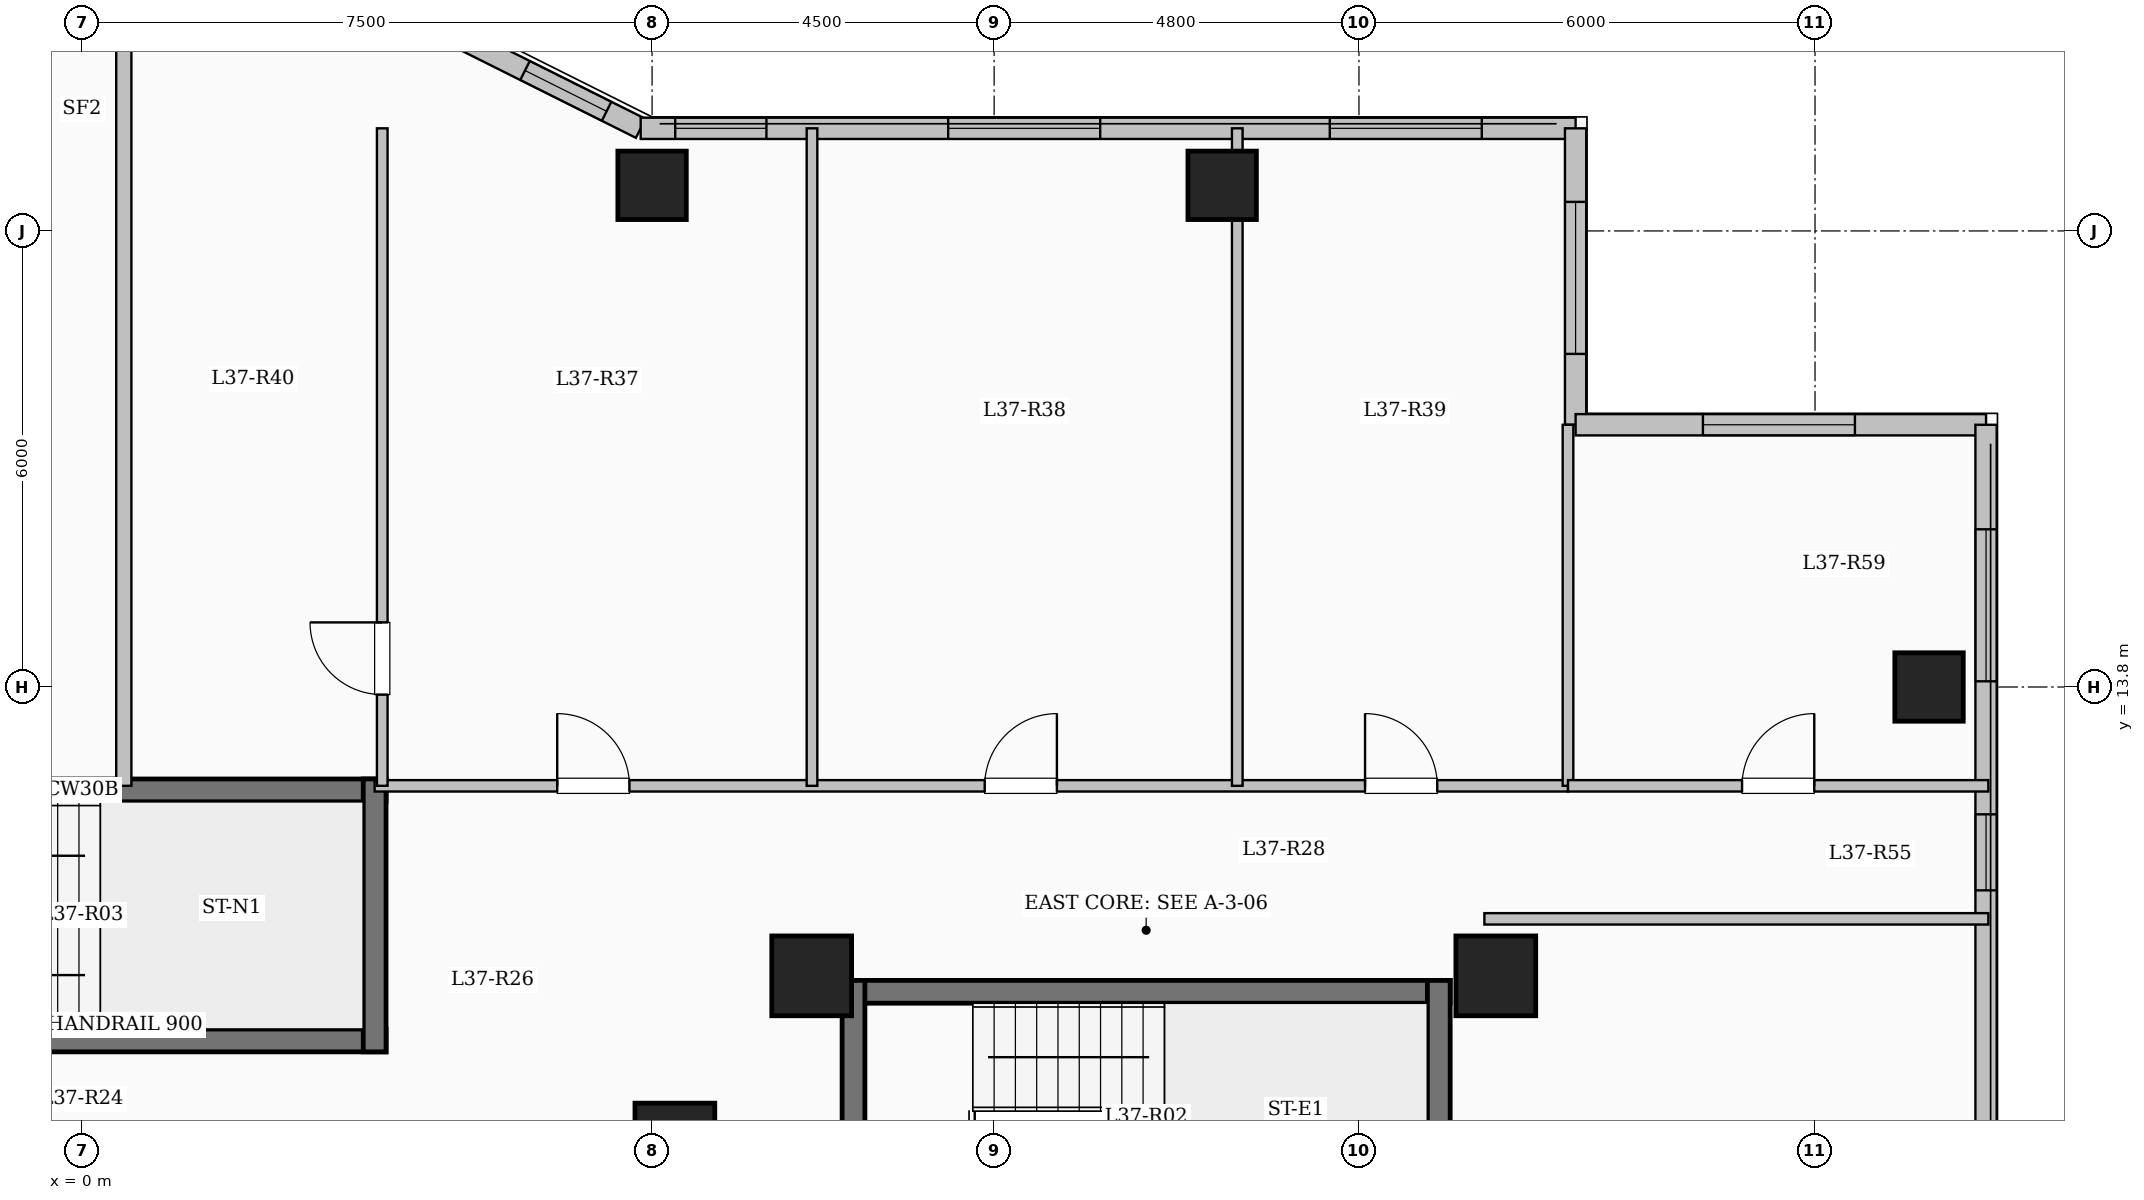
"""IFC4 building model, lengths in metres.
Left out: names, types, materials, properties, quantities, classifications, styles, units other than length and angle.
Written with IfcOpenShell. Run it as: python <this file> out.ifc"""

import sys

from ifc_helpers import new_model, si_unit, direction, frame, frame_2d, origin, origin_2d, place, context, subcontext, project, spatial, rectangle, extrude, element, fill, save


model = new_model("IFC4")
c1 = context("Model", 3, precision=1e-05, world=origin(), true_north=direction((0.0, 1.0)))
c2 = subcontext(c1, "Body", "Model", "MODEL_VIEW")
j1 = project(units=[si_unit("LENGTHUNIT", "METRE"), si_unit("PLANEANGLEUNIT", "RADIAN")], contexts=[c1])
p1 = place(None, origin())
s1 = spatial("IfcSite", under=j1, at=p1, CompositionType="ELEMENT")
p2 = place(p1, origin())
s2 = spatial("IfcBuilding", under=s1, at=p2, CompositionType="ELEMENT")
p3 = place(p2, frame((0.0, 0.0, 139.3)))
s3 = spatial("IfcBuildingStorey", under=s2, at=p3, CompositionType="ELEMENT", Elevation=139.3)
for number, where, z_axis, x_axis in (
    (1, (7.8, 7.8, 0.0), (0.0, 0.0, 1.0), (1.0, 0.0, 0.0)),
    (2, (9.6, 10.0, 0.0), (0.0, 0.0, 1.0), (1.0, 0.0, 0.0)),
    (3, (18.6, 10.0, 0.0), (0.0, 0.0, 1.0), (1.0, 0.0, 0.0)),
):
    element("IfcColumn", number, at=place(p3, frame(where, z_axis=z_axis, x_axis=x_axis)), inside=s3, PredefinedType="COLUMN", context=c2, shape_type="SweptSolid", body=[
        extrude(rectangle(XDim=1.05, YDim=1.05, at=origin_2d()), origin(), (0.0, 0.0, 1.0), 3.35),
    ])
for number, where, z_axis, x_axis in (
    (4, (7.5, 20.4, 0.0), (0.0, 0.0, 1.0), (1.0, 0.0, 0.0)),
    (5, (15.0, 20.4, 0.0), (0.0, 0.0, 1.0), (1.0, 0.0, 0.0)),
    (6, (24.3, 13.8, 0.0), (0.0, 0.0, 1.0), (1.0, 0.0, 0.0)),
):
    element("IfcColumn", number, at=place(p3, frame(where, z_axis=z_axis, x_axis=x_axis)), inside=s3, PredefinedType="COLUMN", context=c2, shape_type="SweptSolid", body=[
        extrude(rectangle(XDim=0.9, YDim=0.9, at=origin_2d()), origin(), (0.0, 0.0, 1.0), 3.35),
    ])
p4 = place(p3, frame((4.35, 22.65, 0.0), z_axis=(0.0, 0.0, 1.0), x_axis=(0.894427191, -0.4472135955, 0.0)))
e7 = element("IfcWall", 7, at=p4, inside=s3, PredefinedType="SOLIDWALL", context=c2, shape_type="SweptSolid", body=[
    extrude(rectangle(XDim=3.354, YDim=0.28, at=frame_2d((1.677, 0.0))), origin(), (0.0, 0.0, 1.0), 3.1),
])
p5 = place(p4, frame((1.653, 0.0, 0.95)))
e8 = element("IfcOpeningElement", 8, at=p5, cuts=e7, PredefinedType="OPENING", context=c2, shape_type="SweptSolid", body=[
    extrude(rectangle(XDim=1.2, YDim=1.5, at=frame_2d((0.6, 0.75))), frame((0.0, 0.15, 0.0), z_axis=(0.0, -1.0, 0.0), x_axis=(1.0, 0.0, 0.0)), (0.0, 0.0, 1.0), 0.3),
])
p6 = place(p3, frame((7.35, 21.15, 0.0), z_axis=(0.0, 0.0, 1.0), x_axis=(1.0, 0.0, 0.0)))
e9 = element("IfcWall", 9, at=p6, inside=s3, PredefinedType="SOLIDWALL", context=c2, shape_type="SweptSolid", body=[
    extrude(rectangle(XDim=12.3, YDim=0.28, at=frame_2d((6.15, 0.0))), origin(), (0.0, 0.0, 1.0), 3.1),
])
p7 = place(p6, frame((0.454, 0.0, 0.95)))
e10 = element("IfcOpeningElement", 10, at=p7, cuts=e9, PredefinedType="OPENING", context=c2, shape_type="SweptSolid", body=[
    extrude(rectangle(XDim=1.2, YDim=1.5, at=frame_2d((0.6, 0.75))), frame((0.0, 0.15, 0.0), z_axis=(0.0, -1.0, 0.0), x_axis=(1.0, 0.0, 0.0)), (0.0, 0.0, 1.0), 0.3),
])
p8 = place(p6, frame((4.045, 0.0, 0.9)))
e11 = element("IfcOpeningElement", 11, at=p8, cuts=e9, PredefinedType="OPENING", context=c2, shape_type="SweptSolid", body=[
    extrude(rectangle(XDim=2.0, YDim=1.7, at=frame_2d((1.0, 0.85))), frame((0.0, 0.15, 0.0), z_axis=(0.0, -1.0, 0.0), x_axis=(1.0, 0.0, 0.0)), (0.0, 0.0, 1.0), 0.3),
])
p9 = place(p6, frame((9.066, 0.0, 0.9)))
e12 = element("IfcOpeningElement", 12, at=p9, cuts=e9, PredefinedType="OPENING", context=c2, shape_type="SweptSolid", body=[
    extrude(rectangle(XDim=2.0, YDim=1.7, at=frame_2d((1.0, 0.85))), frame((0.0, 0.15, 0.0), z_axis=(0.0, -1.0, 0.0), x_axis=(1.0, 0.0, 0.0)), (0.0, 0.0, 1.0), 0.3),
])
p10 = place(p3, frame((19.65, 21.15, 0.0), z_axis=(0.0, 0.0, 1.0), x_axis=(0.0, -1.0, 0.0)))
e13 = element("IfcWall", 13, at=p10, inside=s3, PredefinedType="SOLIDWALL", context=c2, shape_type="SweptSolid", body=[
    extrude(rectangle(XDim=3.9, YDim=0.28, at=frame_2d((1.95, 0.0))), origin(), (0.0, 0.0, 1.0), 3.1),
])
p11 = place(p10, frame((0.968, 0.0, 0.9)))
e14 = element("IfcOpeningElement", 14, at=p11, cuts=e13, PredefinedType="OPENING", context=c2, shape_type="SweptSolid", body=[
    extrude(rectangle(XDim=2.0, YDim=1.7, at=frame_2d((1.0, 0.85))), frame((0.0, 0.15, 0.0), z_axis=(0.0, -1.0, 0.0), x_axis=(1.0, 0.0, 0.0)), (0.0, 0.0, 1.0), 0.3),
])
p12 = place(p3, frame((19.65, 17.25, 0.0), z_axis=(0.0, 0.0, 1.0), x_axis=(1.0, 0.0, 0.0)))
e15 = element("IfcWall", 15, at=p12, inside=s3, PredefinedType="SOLIDWALL", context=c2, shape_type="SweptSolid", body=[
    extrude(rectangle(XDim=5.4, YDim=0.28, at=frame_2d((2.7, 0.0))), origin(), (0.0, 0.0, 1.0), 3.1),
])
p13 = place(p12, frame((1.675, 0.0, 0.9)))
e16 = element("IfcOpeningElement", 16, at=p13, cuts=e15, PredefinedType="OPENING", context=c2, shape_type="SweptSolid", body=[
    extrude(rectangle(XDim=2.0, YDim=1.7, at=frame_2d((1.0, 0.85))), frame((0.0, 0.15, 0.0), z_axis=(0.0, -1.0, 0.0), x_axis=(1.0, 0.0, 0.0)), (0.0, 0.0, 1.0), 0.3),
])
p14 = place(p3, frame((25.05, 17.25, 0.0), z_axis=(0.0, 0.0, 1.0), x_axis=(0.0, -1.0, 0.0)))
e17 = element("IfcWall", 17, at=p14, inside=s3, PredefinedType="SOLIDWALL", context=c2, shape_type="SweptSolid", body=[
    extrude(rectangle(XDim=34.5, YDim=0.28, at=frame_2d((17.25, 0.0))), origin(), (0.0, 0.0, 1.0), 3.1),
])
p15 = place(p14, frame((1.375, 0.0, 0.9)))
e18 = element("IfcOpeningElement", 18, at=p15, cuts=e17, PredefinedType="OPENING", context=c2, shape_type="SweptSolid", body=[
    extrude(rectangle(XDim=2.0, YDim=1.7, at=frame_2d((1.0, 0.85))), frame((0.0, 0.15, 0.0), z_axis=(0.0, -1.0, 0.0), x_axis=(1.0, 0.0, 0.0)), (0.0, 0.0, 1.0), 0.3),
])
p16 = place(p14, frame((5.125, 0.0, 0.95)))
e19 = element("IfcOpeningElement", 19, at=p16, cuts=e17, PredefinedType="OPENING", context=c2, shape_type="SweptSolid", body=[
    extrude(rectangle(XDim=1.0, YDim=1.5, at=frame_2d((0.5, 0.75))), frame((0.0, 0.15, 0.0), z_axis=(0.0, -1.0, 0.0), x_axis=(1.0, 0.0, 0.0)), (0.0, 0.0, 1.0), 0.3),
])
p17 = place(p14, frame((14.5, 0.0, 0.9)))
e20 = element("IfcOpeningElement", 20, at=p17, cuts=e17, PredefinedType="OPENING", context=c2, shape_type="SweptSolid", body=[
    extrude(rectangle(XDim=2.0, YDim=1.7, at=frame_2d((1.0, 0.85))), frame((0.0, 0.15, 0.0), z_axis=(0.0, -1.0, 0.0), x_axis=(1.0, 0.0, 0.0)), (0.0, 0.0, 1.0), 0.3),
])
p18 = place(p14, frame((25.258, 0.0, 0.9)))
e21 = element("IfcOpeningElement", 21, at=p18, cuts=e17, PredefinedType="OPENING", context=c2, shape_type="SweptSolid", body=[
    extrude(rectangle(XDim=1.5, YDim=1.65, at=frame_2d((0.75, 0.825))), frame((0.0, 0.15, 0.0), z_axis=(0.0, -1.0, 0.0), x_axis=(1.0, 0.0, 0.0)), (0.0, 0.0, 1.0), 0.3),
])
p19 = place(p14, frame((29.95, 0.0, 0.9)))
e22 = element("IfcOpeningElement", 22, at=p19, cuts=e17, PredefinedType="OPENING", context=c2, shape_type="SweptSolid", body=[
    extrude(rectangle(XDim=2.2, YDim=1.75, at=frame_2d((1.1, 0.875))), frame((0.0, 0.15, 0.0), z_axis=(0.0, -1.0, 0.0), x_axis=(1.0, 0.0, 0.0)), (0.0, 0.0, 1.0), 0.3),
])
p20 = place(p3, frame((10.0, 9.79, 0.0), z_axis=(0.0, 0.0, 1.0), x_axis=(1.0, 0.0, 0.0)))
e23 = element("IfcWall", 23, at=p20, inside=s3, PredefinedType="SHEAR", context=c2, shape_type="SweptSolid", body=[
    extrude(rectangle(XDim=8.0, YDim=0.3, at=frame_2d((4.0, 0.0))), origin(), (0.0, 0.0, 1.0), 3.35),
])
for number, where, z_axis, x_axis in (
    (24, (10.15, 6.35, 0.0), (0.0, 0.0, 1.0), (0.0, 1.0, 0.0)),
    (25, (17.85, 6.35, 0.0), (0.0, 0.0, 1.0), (0.0, 1.0, 0.0)),
):
    element("IfcWall", number, at=place(p3, frame(where, z_axis=z_axis, x_axis=x_axis)), inside=s3, PredefinedType="SHEAR", context=c2, shape_type="SweptSolid", body=[
        extrude(rectangle(XDim=3.59, YDim=0.3, at=frame_2d((1.795, 0.0))), origin(), (0.0, 0.0, 1.0), 3.35),
    ])
p21 = place(p3, frame((-4.0, 12.44, 0.0), z_axis=(0.0, 0.0, 1.0), x_axis=(1.0, 0.0, 0.0)))
e26 = element("IfcWall", 26, at=p21, inside=s3, PredefinedType="SHEAR", context=c2, shape_type="SweptSolid", body=[
    extrude(rectangle(XDim=8.0, YDim=0.3, at=frame_2d((4.0, 0.0))), origin(), (0.0, 0.0, 1.0), 3.35),
])
p22 = place(p3, frame((-4.0, 9.15, 0.0), z_axis=(0.0, 0.0, 1.0), x_axis=(1.0, 0.0, 0.0)))
e27 = element("IfcWall", 27, at=p22, inside=s3, PredefinedType="SHEAR", context=c2, shape_type="SweptSolid", body=[
    extrude(rectangle(XDim=8.0, YDim=0.3, at=frame_2d((4.0, 0.0))), origin(), (0.0, 0.0, 1.0), 3.35),
])
p23 = place(p22, frame((0.55, 0.0, 0.0)))
e28 = element("IfcOpeningElement", 28, at=p23, cuts=e27, PredefinedType="OPENING", context=c2, shape_type="SweptSolid", body=[
    extrude(rectangle(XDim=1.0, YDim=2.15, at=frame_2d((0.5, 1.075))), frame((0.0, 0.16, 0.0), z_axis=(0.0, -1.0, 0.0), x_axis=(1.0, 0.0, 0.0)), (0.0, 0.0, 1.0), 0.32),
])
p24 = place(p3, frame((3.85, 9.0, 0.0), z_axis=(0.0, 0.0, 1.0), x_axis=(0.0, 1.0, 0.0)))
e29 = element("IfcWall", 29, at=p24, inside=s3, PredefinedType="SHEAR", context=c2, shape_type="SweptSolid", body=[
    extrude(rectangle(XDim=3.59, YDim=0.3, at=frame_2d((1.795, 0.0))), origin(), (0.0, 0.0, 1.0), 3.35),
])
p25 = place(p3, frame((3.85, 12.5, 0.0), z_axis=(0.0, 0.0, 1.0), x_axis=(1.0, 0.0, 0.0)))
e30 = element("IfcWall", 30, at=p25, inside=s3, PredefinedType="PARTITIONING", context=c2, shape_type="SweptSolid", body=[
    extrude(rectangle(XDim=15.7, YDim=0.15, at=frame_2d((7.85, 0.0))), origin(), (0.0, 0.0, 1.0), 3.1),
])
p26 = place(p25, frame((2.402, 0.0, 0.0)))
e31 = element("IfcOpeningElement", 31, at=p26, cuts=e30, PredefinedType="OPENING", context=c2, shape_type="SweptSolid", body=[
    extrude(rectangle(XDim=0.95, YDim=2.15, at=frame_2d((0.475, 1.075))), frame((0.0, 0.085, 0.0), z_axis=(0.0, -1.0, 0.0), x_axis=(1.0, 0.0, 0.0)), (0.0, 0.0, 1.0), 0.17),
])
p27 = place(p25, frame((8.026, 0.0, 0.0)))
e32 = element("IfcOpeningElement", 32, at=p27, cuts=e30, PredefinedType="OPENING", context=c2, shape_type="SweptSolid", body=[
    extrude(rectangle(XDim=0.95, YDim=2.15, at=frame_2d((0.475, 1.075))), frame((0.0, 0.085, 0.0), z_axis=(0.0, -1.0, 0.0), x_axis=(1.0, 0.0, 0.0)), (0.0, 0.0, 1.0), 0.17),
])
p28 = place(p25, frame((13.03, 0.0, 0.0)))
e33 = element("IfcOpeningElement", 33, at=p28, cuts=e30, PredefinedType="OPENING", context=c2, shape_type="SweptSolid", body=[
    extrude(rectangle(XDim=0.95, YDim=2.15, at=frame_2d((0.475, 1.075))), frame((0.0, 0.085, 0.0), z_axis=(0.0, -1.0, 0.0), x_axis=(1.0, 0.0, 0.0)), (0.0, 0.0, 1.0), 0.17),
])
p29 = place(p3, frame((0.55, 12.5, 0.0), z_axis=(0.0, 0.0, 1.0), x_axis=(0.0, 1.0, 0.0)))
e34 = element("IfcWall", 34, at=p29, inside=s3, PredefinedType="SOLIDWALL", context=c2, shape_type="SweptSolid", body=[
    extrude(rectangle(XDim=10.18, YDim=0.2, at=frame_2d((5.09, 0.0))), origin(), (0.0, 0.0, 1.0), 3.1),
])
p30 = place(p3, frame((3.95, 12.5, 0.0), z_axis=(0.0, 0.0, 1.0), x_axis=(0.0, 1.0, 0.0)))
e35 = element("IfcWall", 35, at=p30, inside=s3, PredefinedType="PARTITIONING", context=c2, shape_type="SweptSolid", body=[
    extrude(rectangle(XDim=8.65, YDim=0.14, at=frame_2d((4.325, 0.0))), origin(), (0.0, 0.0, 1.0), 3.1),
])
p31 = place(p30, frame((1.2, 0.0, 0.0)))
e36 = element("IfcOpeningElement", 36, at=p31, cuts=e35, PredefinedType="OPENING", context=c2, shape_type="SweptSolid", body=[
    extrude(rectangle(XDim=0.95, YDim=2.15, at=frame_2d((0.475, 1.075))), frame((0.0, 0.08, 0.0), z_axis=(0.0, -1.0, 0.0), x_axis=(1.0, 0.0, 0.0)), (0.0, 0.0, 1.0), 0.16),
])
p32 = place(p3, frame((9.604, 12.5, 0.0), z_axis=(0.0, 0.0, 1.0), x_axis=(0.0, 1.0, 0.0)))
e37 = element("IfcWall", 37, at=p32, inside=s3, PredefinedType="PARTITIONING", context=c2, shape_type="SweptSolid", body=[
    extrude(rectangle(XDim=8.65, YDim=0.14, at=frame_2d((4.325, 0.0))), origin(), (0.0, 0.0, 1.0), 3.1),
])
p33 = place(p3, frame((15.199, 12.5, 0.0), z_axis=(0.0, 0.0, 1.0), x_axis=(0.0, 1.0, 0.0)))
e38 = element("IfcWall", 38, at=p33, inside=s3, PredefinedType="PARTITIONING", context=c2, shape_type="SweptSolid", body=[
    extrude(rectangle(XDim=8.65, YDim=0.14, at=frame_2d((4.325, 0.0))), origin(), (0.0, 0.0, 1.0), 2.585),
])
p34 = place(p3, frame((18.45, 10.75, 0.0), z_axis=(0.0, 0.0, 1.0), x_axis=(1.0, 0.0, 0.0)))
e39 = element("IfcWall", 39, at=p34, inside=s3, PredefinedType="PARTITIONING", context=c2, shape_type="SweptSolid", body=[
    extrude(rectangle(XDim=6.63, YDim=0.15, at=frame_2d((3.315, 0.0))), origin(), (0.0, 0.0, 1.0), 3.1),
])
p35 = place(p3, frame((19.55, 12.5, 0.0), z_axis=(0.0, 0.0, 1.0), x_axis=(0.0, 1.0, 0.0)))
e40 = element("IfcWall", 40, at=p35, inside=s3, PredefinedType="PARTITIONING", context=c2, shape_type="SweptSolid", body=[
    extrude(rectangle(XDim=4.75, YDim=0.14, at=frame_2d((2.375, 0.0))), origin(), (0.0, 0.0, 1.0), 3.1),
])
p36 = place(p3, frame((19.55, 12.5, 0.0), z_axis=(0.0, 0.0, 1.0), x_axis=(1.0, 0.0, 0.0)))
e41 = element("IfcWall", 41, at=p36, inside=s3, PredefinedType="PARTITIONING", context=c2, shape_type="SweptSolid", body=[
    extrude(rectangle(XDim=5.53, YDim=0.15, at=frame_2d((2.765, 0.0))), origin(), (0.0, 0.0, 1.0), 3.1),
])
p37 = place(p36, frame((2.29, 0.0, 0.0)))
e42 = element("IfcOpeningElement", 42, at=p37, cuts=e41, PredefinedType="OPENING", context=c2, shape_type="SweptSolid", body=[
    extrude(rectangle(XDim=0.95, YDim=2.15, at=frame_2d((0.475, 1.075))), frame((0.0, 0.085, 0.0), z_axis=(0.0, -1.0, 0.0), x_axis=(1.0, 0.0, 0.0)), (0.0, 0.0, 1.0), 0.17),
])
p38 = place(p5, origin())
e43 = element("IfcWindow", 43, at=p38, inside=s3, PartitioningType="SINGLE_PANEL", PredefinedType="WINDOW", context=c2, shape_type="SweptSolid", body=[
    extrude(rectangle(XDim=1.2, YDim=1.5, at=frame_2d((0.6, 0.75))), frame((0.0, 0.03, 0.0), z_axis=(0.0, -1.0, 0.0), x_axis=(1.0, 0.0, 0.0)), (0.0, 0.0, 1.0), 0.06),
])
fill(e8, e43)
p39 = place(p7, origin())
e44 = element("IfcWindow", 44, at=p39, inside=s3, PartitioningType="SINGLE_PANEL", PredefinedType="WINDOW", context=c2, shape_type="SweptSolid", body=[
    extrude(rectangle(XDim=1.2, YDim=1.5, at=frame_2d((0.6, 0.75))), frame((0.0, 0.03, 0.0), z_axis=(0.0, -1.0, 0.0), x_axis=(1.0, 0.0, 0.0)), (0.0, 0.0, 1.0), 0.06),
])
fill(e10, e44)
p40 = place(p8, origin())
e45 = element("IfcWindow", 45, at=p40, inside=s3, PartitioningType="SINGLE_PANEL", PredefinedType="WINDOW", context=c2, shape_type="SweptSolid", body=[
    extrude(rectangle(XDim=2.0, YDim=1.7, at=frame_2d((1.0, 0.85))), frame((0.0, 0.03, 0.0), z_axis=(0.0, -1.0, 0.0), x_axis=(1.0, 0.0, 0.0)), (0.0, 0.0, 1.0), 0.06),
])
fill(e11, e45)
p41 = place(p9, origin())
e46 = element("IfcWindow", 46, at=p41, inside=s3, PartitioningType="SINGLE_PANEL", PredefinedType="WINDOW", context=c2, shape_type="SweptSolid", body=[
    extrude(rectangle(XDim=2.0, YDim=1.7, at=frame_2d((1.0, 0.85))), frame((0.0, 0.03, 0.0), z_axis=(0.0, -1.0, 0.0), x_axis=(1.0, 0.0, 0.0)), (0.0, 0.0, 1.0), 0.06),
])
fill(e12, e46)
p42 = place(p11, origin())
e47 = element("IfcWindow", 47, at=p42, inside=s3, PartitioningType="SINGLE_PANEL", PredefinedType="WINDOW", context=c2, shape_type="SweptSolid", body=[
    extrude(rectangle(XDim=2.0, YDim=1.7, at=frame_2d((1.0, 0.85))), frame((0.0, 0.03, 0.0), z_axis=(0.0, -1.0, 0.0), x_axis=(1.0, 0.0, 0.0)), (0.0, 0.0, 1.0), 0.06),
])
fill(e14, e47)
p43 = place(p13, origin())
e48 = element("IfcWindow", 48, at=p43, inside=s3, PartitioningType="SINGLE_PANEL", PredefinedType="WINDOW", context=c2, shape_type="SweptSolid", body=[
    extrude(rectangle(XDim=2.0, YDim=1.7, at=frame_2d((1.0, 0.85))), frame((0.0, 0.03, 0.0), z_axis=(0.0, -1.0, 0.0), x_axis=(1.0, 0.0, 0.0)), (0.0, 0.0, 1.0), 0.06),
])
fill(e16, e48)
p44 = place(p15, origin())
e49 = element("IfcWindow", 49, at=p44, inside=s3, PartitioningType="SINGLE_PANEL", PredefinedType="WINDOW", context=c2, shape_type="SweptSolid", body=[
    extrude(rectangle(XDim=2.0, YDim=1.7, at=frame_2d((1.0, 0.85))), frame((0.0, 0.03, 0.0), z_axis=(0.0, -1.0, 0.0), x_axis=(1.0, 0.0, 0.0)), (0.0, 0.0, 1.0), 0.06),
])
fill(e18, e49)
p45 = place(p16, origin())
e50 = element("IfcWindow", 50, at=p45, inside=s3, PartitioningType="SINGLE_PANEL", PredefinedType="WINDOW", context=c2, shape_type="SweptSolid", body=[
    extrude(rectangle(XDim=1.0, YDim=1.5, at=frame_2d((0.5, 0.75))), frame((0.0, 0.03, 0.0), z_axis=(0.0, -1.0, 0.0), x_axis=(1.0, 0.0, 0.0)), (0.0, 0.0, 1.0), 0.06),
])
fill(e19, e50)
p46 = place(p26, origin())
e51 = element("IfcDoor", 51, at=p46, inside=s3, OperationType="SINGLE_SWING_LEFT", PredefinedType="DOOR", context=c2, shape_type="SweptSolid", body=[
    extrude(rectangle(XDim=0.95, YDim=2.15, at=frame_2d((0.475, 1.075))), frame((0.0, 0.025, 0.0), z_axis=(0.0, -1.0, 0.0), x_axis=(1.0, 0.0, 0.0)), (0.0, 0.0, 1.0), 0.05),
])
fill(e31, e51)
p47 = place(p27, origin())
e52 = element("IfcDoor", 52, at=p47, inside=s3, OperationType="SINGLE_SWING_RIGHT", PredefinedType="DOOR", context=c2, shape_type="SweptSolid", body=[
    extrude(rectangle(XDim=0.95, YDim=2.15, at=frame_2d((0.475, 1.075))), frame((0.0, 0.025, 0.0), z_axis=(0.0, -1.0, 0.0), x_axis=(1.0, 0.0, 0.0)), (0.0, 0.0, 1.0), 0.05),
])
fill(e32, e52)
p48 = place(p28, origin())
e53 = element("IfcDoor", 53, at=p48, inside=s3, OperationType="SINGLE_SWING_LEFT", PredefinedType="DOOR", context=c2, shape_type="SweptSolid", body=[
    extrude(rectangle(XDim=0.95, YDim=2.15, at=frame_2d((0.475, 1.075))), frame((0.0, 0.025, 0.0), z_axis=(0.0, -1.0, 0.0), x_axis=(1.0, 0.0, 0.0)), (0.0, 0.0, 1.0), 0.05),
])
fill(e33, e53)
p49 = place(p31, origin())
e54 = element("IfcDoor", 54, at=p49, inside=s3, OperationType="SINGLE_SWING_RIGHT", PredefinedType="DOOR", context=c2, shape_type="SweptSolid", body=[
    extrude(rectangle(XDim=0.95, YDim=2.15, at=frame_2d((0.475, 1.075))), frame((0.0, 0.025, 0.0), z_axis=(0.0, -1.0, 0.0), x_axis=(1.0, 0.0, 0.0)), (0.0, 0.0, 1.0), 0.05),
])
fill(e36, e54)
p50 = place(p37, origin())
e55 = element("IfcDoor", 55, at=p50, inside=s3, OperationType="SINGLE_SWING_RIGHT", PredefinedType="DOOR", context=c2, shape_type="SweptSolid", body=[
    extrude(rectangle(XDim=0.95, YDim=2.15, at=frame_2d((0.475, 1.075))), frame((0.0, 0.025, 0.0), z_axis=(0.0, -1.0, 0.0), x_axis=(1.0, 0.0, 0.0)), (0.0, 0.0, 1.0), 0.05),
])
fill(e42, e55)
save(model, sys.argv[1])
